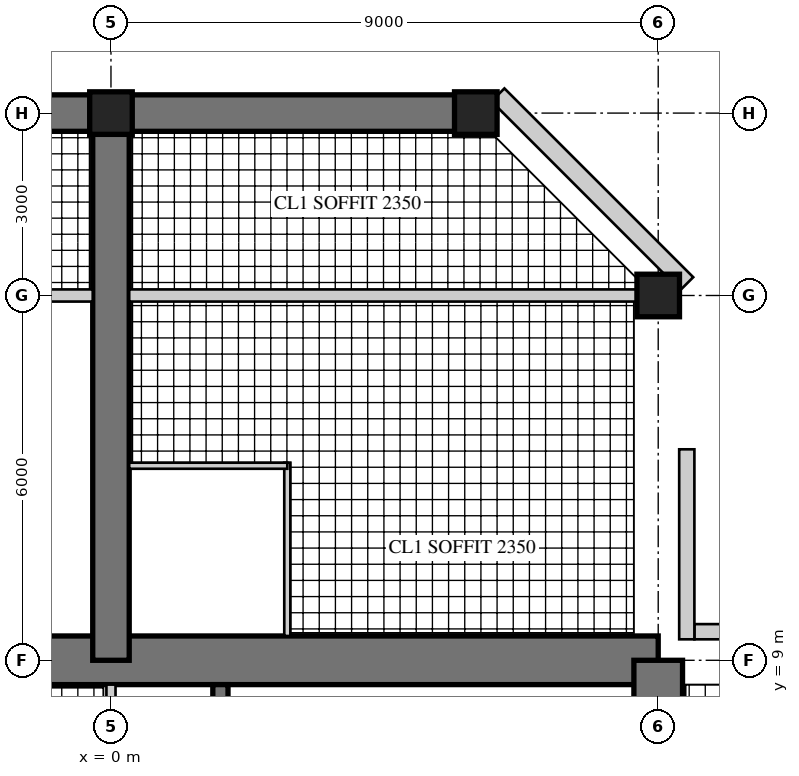
"""IFC4 building model, lengths in metres.
Left out: names, types, materials, properties, quantities, classifications, styles, units other than length and angle.
Written with IfcOpenShell. Run it as: python <this file> out.ifc"""

import sys

from ifc_helpers import new_model, si_unit, direction, frame, frame_2d, origin, origin_2d, place, context, subcontext, project, spatial, rectangle, hollow_rectangle, extrude, element, fill, save


model = new_model("IFC4")
c1 = context("Model", 3, precision=1e-05, world=origin(), true_north=direction((0.0, 1.0)))
c2 = subcontext(c1, "Body", "Model", "MODEL_VIEW")
j1 = project(units=[si_unit("LENGTHUNIT", "METRE"), si_unit("PLANEANGLEUNIT", "RADIAN")], contexts=[c1])
p1 = place(None, origin())
s1 = spatial("IfcSite", under=j1, at=p1, CompositionType="ELEMENT")
p2 = place(p1, origin())
s2 = spatial("IfcBuilding", under=s1, at=p2, CompositionType="ELEMENT")
p3 = place(p2, frame((0.0, 0.0, 267.9)))
s3 = spatial("IfcBuildingStorey", under=s2, at=p3, CompositionType="ELEMENT", Elevation=267.9)
p4 = place(p3, frame((9.0, 9.0, 0.0), z_axis=(0.0, 0.0, 1.0), x_axis=(-1.0, 0.0, 0.0)))
e1 = element("IfcWall", 1, at=p4, inside=s3, PredefinedType="SHEAR", context=c2, shape_type="SweptSolid", body=[
    extrude(rectangle(XDim=18.0, YDim=0.8, at=frame_2d((9.0, 0.0))), origin(), (0.0, 0.0, 1.0), 3.4),
])
p5 = place(p4, frame((9.8, 0.0, 0.0)))
e2 = element("IfcOpeningElement", 2, at=p5, cuts=e1, PredefinedType="OPENING", context=c2, shape_type="SweptSolid", body=[
    extrude(rectangle(XDim=1.0, YDim=2.4, at=frame_2d((0.5, 1.2))), frame((0.0, 0.41, 0.0), z_axis=(0.0, -1.0, 0.0), x_axis=(1.0, 0.0, 0.0)), (0.0, 0.0, 1.0), 0.82),
])
p6 = place(p3, frame((9.0, -9.0, 0.0), z_axis=(0.0, 0.0, 1.0), x_axis=(0.0, 1.0, 0.0)))
e3 = element("IfcWall", 3, at=p6, inside=s3, PredefinedType="SHEAR", context=c2, shape_type="SweptSolid", body=[
    extrude(rectangle(XDim=18.0, YDim=0.8, at=frame_2d((9.0, 0.0))), origin(), (0.0, 0.0, 1.0), 3.4),
])
p7 = place(p6, frame((9.8, 0.0, 0.0)))
e4 = element("IfcOpeningElement", 4, at=p7, cuts=e3, PredefinedType="OPENING", context=c2, shape_type="SweptSolid", body=[
    extrude(rectangle(XDim=1.0, YDim=2.4, at=frame_2d((0.5, 1.2))), frame((0.0, 0.41, 0.0), z_axis=(0.0, -1.0, 0.0), x_axis=(1.0, 0.0, 0.0)), (0.0, 0.0, 1.0), 0.82),
])
p8 = place(p3, frame((1.8, 1.875, 0.0), z_axis=(0.0, 0.0, 1.0), x_axis=(0.0, 1.0, 0.0)))
e5 = element("IfcWall", 5, at=p8, inside=s3, PredefinedType="SHEAR", context=c2, shape_type="SweptSolid", body=[
    extrude(rectangle(XDim=6.725, YDim=0.25, at=frame_2d((3.363, 0.0))), origin(), (0.0, 0.0, 1.0), 3.4),
])
p9 = place(p8, frame((1.875, 0.0, 0.0)))
e6 = element("IfcOpeningElement", 6, at=p9, cuts=e5, PredefinedType="OPENING", context=c2, shape_type="SweptSolid", body=[
    extrude(rectangle(XDim=1.6, YDim=2.4, at=frame_2d((0.8, 1.2))), frame((0.0, 0.135, 0.0), z_axis=(0.0, -1.0, 0.0), x_axis=(1.0, 0.0, 0.0)), (0.0, 0.0, 1.0), 0.27),
])
p10 = place(p3, frame((0.0, 9.0, 0.0), z_axis=(0.0, 0.0, 1.0), x_axis=(0.0, 1.0, 0.0)))
e7 = element("IfcWall", 7, at=p10, inside=s3, PredefinedType="SHEAR", context=c2, shape_type="SweptSolid", body=[
    extrude(rectangle(XDim=9.0, YDim=0.6, at=frame_2d((4.5, 0.0))), origin(), (0.0, 0.0, 1.0), 3.4),
])
p11 = place(p10, frame((3.8, 0.0, 0.0)))
e8 = element("IfcOpeningElement", 8, at=p11, cuts=e7, PredefinedType="OPENING", context=c2, shape_type="SweptSolid", body=[
    extrude(rectangle(XDim=1.0, YDim=2.15, at=frame_2d((0.5, 1.075))), frame((0.0, 0.31, 0.0), z_axis=(0.0, -1.0, 0.0), x_axis=(1.0, 0.0, 0.0)), (0.0, 0.0, 1.0), 0.62),
])
p12 = place(p10, frame((7.0, 0.0, 0.0)))
e9 = element("IfcOpeningElement", 9, at=p12, cuts=e7, PredefinedType="OPENING", context=c2, shape_type="SweptSolid", body=[
    extrude(rectangle(XDim=1.0, YDim=2.2, at=frame_2d((0.5, 1.1))), frame((0.0, 0.31, 0.0), z_axis=(0.0, -1.0, 0.0), x_axis=(1.0, 0.0, 0.0)), (0.0, 0.0, 1.0), 0.62),
])
p13 = place(p3, frame((6.0, 18.0, 0.0), z_axis=(0.0, 0.0, 1.0), x_axis=(-1.0, 0.0, 0.0)))
e10 = element("IfcWall", 10, at=p13, inside=s3, PredefinedType="SHEAR", context=c2, shape_type="SweptSolid", body=[
    extrude(rectangle(XDim=12.0, YDim=0.6, at=frame_2d((6.0, 0.0))), origin(), (0.0, 0.0, 1.0), 3.4),
])
p14 = place(p13, frame((1.625, 0.0, 0.6)))
e11 = element("IfcOpeningElement", 11, at=p14, cuts=e10, PredefinedType="OPENING", context=c2, shape_type="SweptSolid", body=[
    extrude(rectangle(XDim=3.0, YDim=2.4, at=frame_2d((1.5, 1.2))), frame((0.0, 0.31, 0.0), z_axis=(0.0, -1.0, 0.0), x_axis=(1.0, 0.0, 0.0)), (0.0, 0.0, 1.0), 0.62),
])
p15 = place(p13, frame((7.375, 0.0, 0.6)))
e12 = element("IfcOpeningElement", 12, at=p15, cuts=e10, PredefinedType="OPENING", context=c2, shape_type="SweptSolid", body=[
    extrude(rectangle(XDim=3.0, YDim=2.4, at=frame_2d((1.5, 1.2))), frame((0.0, 0.31, 0.0), z_axis=(0.0, -1.0, 0.0), x_axis=(1.0, 0.0, 0.0)), (0.0, 0.0, 1.0), 0.62),
])
for number, where, z_axis, x_axis in (
    (13, (9.0, 15.0, 0.0), (0.0, 0.0, 1.0), (1.0, 0.0, 0.0)),
    (14, (6.0, 18.0, 0.0), (0.0, 0.0, 1.0), (1.0, 0.0, 0.0)),
    (15, (0.0, 18.0, 0.0), (0.0, 0.0, 1.0), (1.0, 0.0, 0.0)),
):
    element("IfcColumn", number, at=place(p3, frame(where, z_axis=z_axis, x_axis=x_axis)), inside=s3, PredefinedType="COLUMN", context=c2, shape_type="SweptSolid", body=[
        extrude(rectangle(XDim=0.7, YDim=0.7, at=origin_2d()), origin(), (0.0, 0.0, 1.0), 3.4),
    ])
p16 = place(p3, frame((12.47, 9.47, 0.0), z_axis=(0.0, 0.0, 1.0), x_axis=(-1.0, 0.0, 0.0)))
e16 = element("IfcWall", 16, at=p16, inside=s3, PredefinedType="SOLIDWALL", context=c2, shape_type="SweptSolid", body=[
    extrude(rectangle(XDim=2.875, YDim=0.25, at=frame_2d((1.438, 0.0))), origin(), (0.0, 0.0, 1.0), 3.22),
])
p17 = place(p16, frame((0.6, 0.0, 0.0)))
e17 = element("IfcOpeningElement", 17, at=p17, cuts=e16, PredefinedType="OPENING", context=c2, shape_type="SweptSolid", body=[
    extrude(rectangle(XDim=1.0, YDim=2.2, at=frame_2d((0.5, 1.1))), frame((0.0, 0.135, 0.0), z_axis=(0.0, -1.0, 0.0), x_axis=(1.0, 0.0, 0.0)), (0.0, 0.0, 1.0), 0.27),
])
p18 = place(p3, frame((9.47, 9.345, 0.0), z_axis=(0.0, 0.0, 1.0), x_axis=(0.0, 1.0, 0.0)))
e18 = element("IfcWall", 18, at=p18, inside=s3, PredefinedType="SOLIDWALL", context=c2, shape_type="SweptSolid", body=[
    extrude(rectangle(XDim=3.125, YDim=0.25, at=frame_2d((1.562, 0.0))), origin(), (0.0, 0.0, 1.0), 3.22),
])
p19 = place(p18, frame((0.6, 0.0, 0.0)))
e19 = element("IfcOpeningElement", 19, at=p19, cuts=e18, PredefinedType="OPENING", context=c2, shape_type="SweptSolid", body=[
    extrude(rectangle(XDim=1.0, YDim=2.2, at=frame_2d((0.5, 1.1))), frame((0.0, 0.135, 0.0), z_axis=(0.0, -1.0, 0.0), x_axis=(1.0, 0.0, 0.0)), (0.0, 0.0, 1.0), 0.27),
])
p20 = place(p3, frame((9.47, 15.195, 0.0), z_axis=(0.0, 0.0, 1.0), x_axis=(-0.70707898447, 0.707134576811, 0.0)))
e20 = element("IfcWall", 20, at=p20, inside=s3, PredefinedType="SOLIDWALL", context=c2, shape_type="SweptSolid", body=[
    extrude(rectangle(XDim=4.392, YDim=0.3, at=frame_2d((2.196, 0.0))), origin(), (0.0, 0.0, 1.0), 3.22),
])
p21 = place(p20, frame((1.746, 0.0, 0.3)))
e21 = element("IfcOpeningElement", 21, at=p21, cuts=e20, PredefinedType="OPENING", context=c2, shape_type="SweptSolid", body=[
    extrude(rectangle(XDim=0.9, YDim=2.4, at=frame_2d((0.45, 1.2))), frame((0.0, 0.16, 0.0), z_axis=(0.0, -1.0, 0.0), x_axis=(1.0, 0.0, 0.0)), (0.0, 0.0, 1.0), 0.32),
])
p22 = place(p3, frame((0.0, 5.675, 0.0), z_axis=(0.0, 0.0, 1.0), x_axis=(0.0, 1.0, 0.0)))
e22 = element("IfcWall", 22, at=p22, inside=s3, PredefinedType="PARTITIONING", context=c2, shape_type="SweptSolid", body=[
    extrude(rectangle(XDim=2.925, YDim=0.15, at=frame_2d((1.462, 0.0))), origin(), (0.0, 0.0, 1.0), 3.22),
])
p23 = place(p22, frame((0.4, 0.0, 0.0)))
e23 = element("IfcOpeningElement", 23, at=p23, cuts=e22, PredefinedType="OPENING", context=c2, shape_type="SweptSolid", body=[
    extrude(rectangle(XDim=1.0, YDim=2.1, at=frame_2d((0.5, 1.05))), frame((0.0, 0.085, 0.0), z_axis=(0.0, -1.0, 0.0), x_axis=(1.0, 0.0, 0.0)), (0.0, 0.0, 1.0), 0.17),
])
p24 = place(p3, frame((2.9, 9.4, 0.0), z_axis=(0.0, 0.0, 1.0), x_axis=(0.0, 1.0, 0.0)))
e24 = element("IfcWall", 24, at=p24, inside=s3, PredefinedType="PARTITIONING", context=c2, shape_type="SweptSolid", body=[
    extrude(rectangle(XDim=2.85, YDim=0.1, at=frame_2d((1.425, 0.0))), origin(), (0.0, 0.0, 1.0), 3.22),
])
p25 = place(p3, frame((2.9, 12.2, 0.0), z_axis=(0.0, 0.0, 1.0), x_axis=(-1.0, 0.0, 0.0)))
e25 = element("IfcWall", 25, at=p25, inside=s3, PredefinedType="PARTITIONING", context=c2, shape_type="SweptSolid", body=[
    extrude(rectangle(XDim=2.6, YDim=0.1, at=frame_2d((1.3, 0.0))), origin(), (0.0, 0.0, 1.0), 3.22),
])
p26 = place(p25, frame((0.55, 0.0, 0.0)))
e26 = element("IfcOpeningElement", 26, at=p26, cuts=e25, PredefinedType="OPENING", context=c2, shape_type="SweptSolid", body=[
    extrude(rectangle(XDim=0.9, YDim=2.1, at=frame_2d((0.45, 1.05))), frame((0.0, 0.06, 0.0), z_axis=(0.0, -1.0, 0.0), x_axis=(1.0, 0.0, 0.0)), (0.0, 0.0, 1.0), 0.12),
])
p27 = place(p3, frame((8.65, 15.0, 0.0), z_axis=(0.0, 0.0, 1.0), x_axis=(-1.0, 0.0, 0.0)))
e27 = element("IfcWall", 27, at=p27, inside=s3, PredefinedType="SOLIDWALL", context=c2, shape_type="SweptSolid", body=[
    extrude(rectangle(XDim=8.35, YDim=0.2, at=frame_2d((4.175, 0.0))), origin(), (0.0, 0.0, 1.0), 2.52),
])
p28 = place(p3, frame((-0.3, 15.0, 0.0), z_axis=(0.0, 0.0, 1.0), x_axis=(-1.0, 0.0, 0.0)))
e28 = element("IfcWall", 28, at=p28, inside=s3, PredefinedType="SOLIDWALL", context=c2, shape_type="SweptSolid", body=[
    extrude(rectangle(XDim=8.35, YDim=0.2, at=frame_2d((4.175, 0.0))), origin(), (0.0, 0.0, 1.0), 2.52),
])
p29 = place(p28, frame((0.4, 0.0, 0.0)))
e29 = element("IfcOpeningElement", 29, at=p29, cuts=e28, PredefinedType="OPENING", context=c2, shape_type="SweptSolid", body=[
    extrude(rectangle(XDim=1.0, YDim=2.2, at=frame_2d((0.5, 1.1))), frame((0.0, 0.11, 0.0), z_axis=(0.0, -1.0, 0.0), x_axis=(1.0, 0.0, 0.0)), (0.0, 0.0, 1.0), 0.22),
])
p30 = place(p19, origin())
e30 = element("IfcDoor", 30, at=p30, inside=s3, OperationType="SINGLE_SWING_LEFT", PredefinedType="DOOR", context=c2, shape_type="SweptSolid", body=[
    extrude(hollow_rectangle(XDim=1.0, YDim=2.2, WallThickness=0.06, at=frame_2d((0.5, 1.1))), frame((0.0, 0.025, 0.0), z_axis=(0.0, -1.0, 0.0), x_axis=(1.0, 0.0, 0.0)), (0.0, 0.0, 1.0), 0.05),
    extrude(rectangle(XDim=0.879, YDim=2.079, at=frame_2d((0.5, 1.1))), frame((0.0, 0.025, 0.0), z_axis=(0.0, -1.0, 0.0), x_axis=(1.0, 0.0, 0.0)), (0.0, 0.0, 1.0), 0.05),
])
fill(e19, e30)
p31 = place(p21, origin())
e31 = element("IfcWindow", 31, at=p31, inside=s3, PartitioningType="SINGLE_PANEL", PredefinedType="WINDOW", context=c2, shape_type="SweptSolid", body=[
    extrude(hollow_rectangle(XDim=0.9, YDim=2.4, WallThickness=0.06, at=frame_2d((0.45, 1.2))), frame((0.0, 0.03, 0.0), z_axis=(0.0, -1.0, 0.0), x_axis=(1.0, 0.0, 0.0)), (0.0, 0.0, 1.0), 0.06),
    extrude(rectangle(XDim=0.779, YDim=2.279, at=frame_2d((0.45, 1.2))), frame((0.0, 0.03, 0.0), z_axis=(0.0, -1.0, 0.0), x_axis=(1.0, 0.0, 0.0)), (0.0, 0.0, 1.0), 0.06),
])
fill(e21, e31)
p32 = place(p14, origin())
e32 = element("IfcWindow", 32, at=p32, inside=s3, PartitioningType="SINGLE_PANEL", PredefinedType="WINDOW", context=c2, shape_type="SweptSolid", body=[
    extrude(hollow_rectangle(XDim=3.0, YDim=2.4, WallThickness=0.06, at=frame_2d((1.5, 1.2))), frame((0.0, 0.03, 0.0), z_axis=(0.0, -1.0, 0.0), x_axis=(1.0, 0.0, 0.0)), (0.0, 0.0, 1.0), 0.06),
    extrude(rectangle(XDim=2.879, YDim=2.279, at=frame_2d((1.5, 1.2))), frame((0.0, 0.03, 0.0), z_axis=(0.0, -1.0, 0.0), x_axis=(1.0, 0.0, 0.0)), (0.0, 0.0, 1.0), 0.06),
])
fill(e11, e32)
p33 = place(p26, origin())
e33 = element("IfcDoor", 33, at=p33, inside=s3, OperationType="SINGLE_SWING_LEFT", PredefinedType="DOOR", context=c2, shape_type="SweptSolid", body=[
    extrude(rectangle(XDim=0.9, YDim=2.1, at=frame_2d((0.45, 1.05))), frame((0.0, 0.025, 0.0), z_axis=(0.0, -1.0, 0.0), x_axis=(1.0, 0.0, 0.0)), (0.0, 0.0, 1.0), 0.05),
])
fill(e26, e33)
p34 = place(p29, frame((1.0, 0.0, 0.0), z_axis=(0.0, 0.0, 1.0), x_axis=(-1.0, 0.0, 0.0)))
e34 = element("IfcDoor", 34, at=p34, inside=s3, OperationType="SINGLE_SWING_RIGHT", PredefinedType="DOOR", context=c2, shape_type="SweptSolid", body=[
    extrude(rectangle(XDim=1.0, YDim=2.2, at=frame_2d((0.5, 1.1))), frame((0.0, 0.025, 0.0), z_axis=(0.0, -1.0, 0.0), x_axis=(1.0, 0.0, 0.0)), (0.0, 0.0, 1.0), 0.05),
])
fill(e29, e34)
p35 = place(p11, frame((1.0, 0.0, 0.0), z_axis=(0.0, 0.0, 1.0), x_axis=(-1.0, 0.0, 0.0)))
e35 = element("IfcDoor", 35, at=p35, inside=s3, OperationType="SINGLE_SWING_RIGHT", PredefinedType="DOOR", context=c2, shape_type="SweptSolid", body=[
    extrude(rectangle(XDim=1.0, YDim=2.15, at=frame_2d((0.5, 1.075))), frame((0.0, 0.025, 0.0), z_axis=(0.0, -1.0, 0.0), x_axis=(1.0, 0.0, 0.0)), (0.0, 0.0, 1.0), 0.05),
])
fill(e8, e35)
p36 = place(p12, origin())
e36 = element("IfcDoor", 36, at=p36, inside=s3, OperationType="SINGLE_SWING_RIGHT", PredefinedType="DOOR", context=c2, shape_type="SweptSolid", body=[
    extrude(rectangle(XDim=1.0, YDim=2.2, at=frame_2d((0.5, 1.1))), frame((0.0, 0.025, 0.0), z_axis=(0.0, -1.0, 0.0), x_axis=(1.0, 0.0, 0.0)), (0.0, 0.0, 1.0), 0.05),
])
fill(e9, e36)
p37 = place(p5, origin())
e37 = element("IfcDoor", 37, at=p37, inside=s3, OperationType="SINGLE_SWING_RIGHT", PredefinedType="DOOR", context=c2, shape_type="SweptSolid", body=[
    extrude(rectangle(XDim=1.0, YDim=2.4, at=frame_2d((0.5, 1.2))), frame((0.0, 0.055, 0.0), z_axis=(0.0, -1.0, 0.0), x_axis=(1.0, 0.0, 0.0)), (0.0, 0.0, 1.0), 0.05),
])
fill(e2, e37)
save(model, sys.argv[1])
